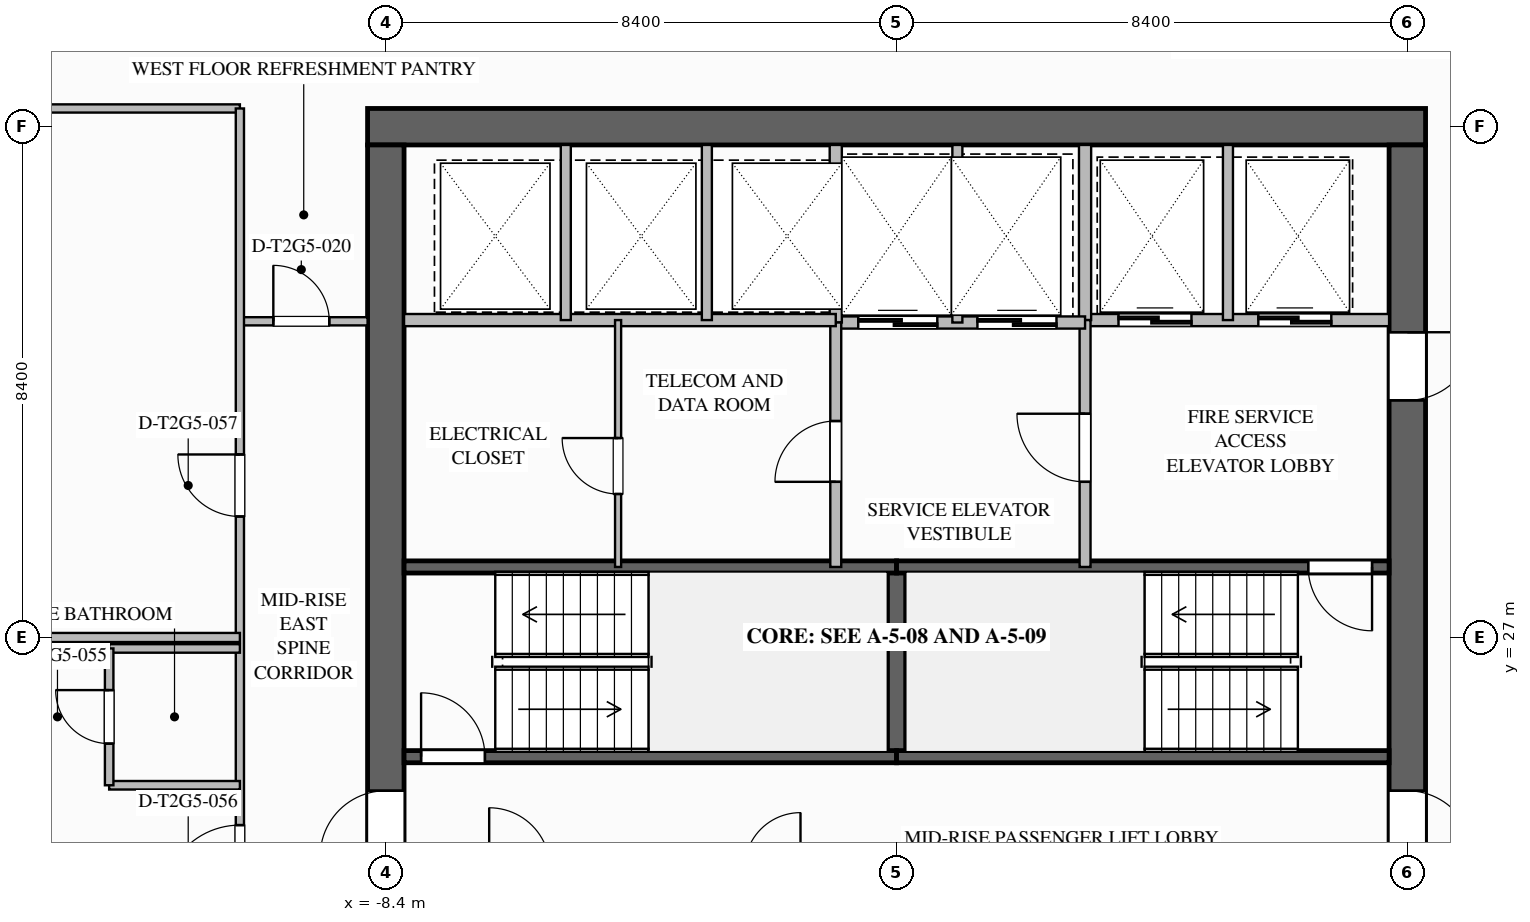
"""IFC4 building model, lengths in metres.
Left out: names, types, materials, properties, quantities, classifications, styles, units other than length and angle.
Written with IfcOpenShell. Run it as: python <this file> out.ifc"""

import sys

from ifc_helpers import new_model, si_unit, direction, frame, frame_2d, origin, place, context, subcontext, project, spatial, rectangle, extrude, element, fill, save


model = new_model("IFC4")
c1 = context("Model", 3, precision=1e-05, world=origin(), true_north=direction((0.0, 1.0)))
c2 = subcontext(c1, "Body", "Model", "MODEL_VIEW")
j1 = project(units=[si_unit("LENGTHUNIT", "METRE"), si_unit("PLANEANGLEUNIT", "RADIAN")], contexts=[c1])
p1 = place(None, origin())
s1 = spatial("IfcSite", under=j1, at=p1, CompositionType="ELEMENT")
p2 = place(p1, origin())
s2 = spatial("IfcBuilding", under=s1, at=p2, CompositionType="ELEMENT")
p3 = place(p2, frame((0.0, 0.0, 133.8)))
s3 = spatial("IfcBuildingStorey", under=s2, at=p3, CompositionType="ELEMENT", Elevation=133.8)
p4 = place(p3, frame((-8.7, 35.4, 0.0), z_axis=(0.0, 0.0, 1.0), x_axis=(1.0, 0.0, 0.0)))
e1 = element("IfcWall", 1, at=p4, inside=s3, PredefinedType="SHEAR", context=c2, shape_type="SweptSolid", body=[
    extrude(rectangle(XDim=17.4, YDim=0.6, at=frame_2d((8.7, 0.0))), origin(), (0.0, 0.0, 1.0), 3.5),
])
p5 = place(p3, frame((8.4, 35.1, 0.0), z_axis=(0.0, 0.0, 1.0), x_axis=(0.0, -1.0, 0.0)))
e2 = element("IfcWall", 2, at=p5, inside=s3, PredefinedType="SHEAR", context=c2, shape_type="SweptSolid", body=[
    extrude(rectangle(XDim=16.2, YDim=0.6, at=frame_2d((8.1, 0.0))), origin(), (0.0, 0.0, 1.0), 3.5),
])
p6 = place(p5, frame((3.08, 0.0, 0.0)))
e3 = element("IfcOpeningElement", 3, at=p6, cuts=e2, PredefinedType="OPENING", context=c2, shape_type="SweptSolid", body=[
    extrude(rectangle(XDim=1.12, YDim=2.1, at=frame_2d((0.56, 1.05))), frame((0.0, 0.31, 0.0), z_axis=(0.0, -1.0, 0.0), x_axis=(1.0, 0.0, 0.0)), (0.0, 0.0, 1.0), 0.62),
])
p7 = place(p5, frame((10.62, 0.0, 0.0)))
e4 = element("IfcOpeningElement", 4, at=p7, cuts=e2, PredefinedType="OPENING", context=c2, shape_type="SweptSolid", body=[
    extrude(rectangle(XDim=1.08, YDim=2.04, at=frame_2d((0.54, 1.02))), frame((0.0, 0.31, 0.0), z_axis=(0.0, -1.0, 0.0), x_axis=(1.0, 0.0, 0.0)), (0.0, 0.0, 1.0), 0.62),
])
p8 = place(p3, frame((-8.4, 18.9, 0.0), z_axis=(0.0, 0.0, 1.0), x_axis=(0.0, 1.0, 0.0)))
e5 = element("IfcWall", 5, at=p8, inside=s3, PredefinedType="SHEAR", context=c2, shape_type="SweptSolid", body=[
    extrude(rectangle(XDim=16.2, YDim=0.6, at=frame_2d((8.1, 0.0))), origin(), (0.0, 0.0, 1.0), 3.5),
])
p9 = place(p8, frame((4.5, 0.0, 0.0)))
e6 = element("IfcOpeningElement", 6, at=p9, cuts=e5, PredefinedType="OPENING", context=c2, shape_type="SweptSolid", body=[
    extrude(rectangle(XDim=1.08, YDim=2.04, at=frame_2d((0.54, 1.02))), frame((0.0, 0.31, 0.0), z_axis=(0.0, -1.0, 0.0), x_axis=(1.0, 0.0, 0.0)), (0.0, 0.0, 1.0), 0.62),
])
p10 = place(p3, frame((0.0, 25.04, 0.0), z_axis=(0.0, 0.0, 1.0), x_axis=(0.0, 1.0, 0.0)))
e7 = element("IfcWall", 7, at=p10, inside=s3, PredefinedType="SOLIDWALL", context=c2, shape_type="SweptSolid", body=[
    extrude(rectangle(XDim=3.12, YDim=0.3, at=frame_2d((1.56, 0.0))), origin(), (0.0, 0.0, 1.0), 3.24),
])
p11 = place(p3, frame((-8.1, 25.04, 0.0), z_axis=(0.0, 0.0, 1.0), x_axis=(1.0, 0.0, 0.0)))
e8 = element("IfcWall", 8, at=p11, inside=s3, PredefinedType="SOLIDWALL", context=c2, shape_type="SweptSolid", body=[
    extrude(rectangle(XDim=8.1, YDim=0.2, at=frame_2d((4.05, 0.0))), origin(), (0.0, 0.0, 1.0), 3.24),
])
p12 = place(p11, frame((0.28, 0.0, 0.0)))
e9 = element("IfcOpeningElement", 9, at=p12, cuts=e8, PredefinedType="OPENING", context=c2, shape_type="SweptSolid", body=[
    extrude(rectangle(XDim=1.05, YDim=2.1, at=frame_2d((0.525, 1.05))), frame((0.0, 0.11, 0.0), z_axis=(0.0, -1.0, 0.0), x_axis=(1.0, 0.0, 0.0)), (0.0, 0.0, 1.0), 0.22),
])
for number, where, z_axis, x_axis in (
    (10, (-8.1, 28.16, 0.0), (0.0, 0.0, 1.0), (1.0, 0.0, 0.0)),
    (11, (0.0, 25.04, 0.0), (0.0, 0.0, 1.0), (1.0, 0.0, 0.0)),
):
    element("IfcWall", number, at=place(p3, frame(where, z_axis=z_axis, x_axis=x_axis)), inside=s3, PredefinedType="SOLIDWALL", context=c2, shape_type="SweptSolid", body=[
        extrude(rectangle(XDim=8.1, YDim=0.2, at=frame_2d((4.05, 0.0))), origin(), (0.0, 0.0, 1.0), 3.24),
    ])
p13 = place(p3, frame((8.1, 28.16, 0.0), z_axis=(0.0, 0.0, 1.0), x_axis=(-1.0, 0.0, 0.0)))
e12 = element("IfcWall", 12, at=p13, inside=s3, PredefinedType="SOLIDWALL", context=c2, shape_type="SweptSolid", body=[
    extrude(rectangle(XDim=8.1, YDim=0.2, at=frame_2d((4.05, 0.0))), origin(), (0.0, 0.0, 1.0), 3.24),
])
p14 = place(p13, frame((0.28, 0.0, 0.0)))
e13 = element("IfcOpeningElement", 13, at=p14, cuts=e12, PredefinedType="OPENING", context=c2, shape_type="SweptSolid", body=[
    extrude(rectangle(XDim=1.05, YDim=2.1, at=frame_2d((0.525, 1.05))), frame((0.0, 0.11, 0.0), z_axis=(0.0, -1.0, 0.0), x_axis=(1.0, 0.0, 0.0)), (0.0, 0.0, 1.0), 0.22),
])
p15 = place(p3, frame((3.1, 32.22, 0.0), z_axis=(0.0, 0.0, 1.0), x_axis=(1.0, 0.0, 0.0)))
e14 = element("IfcWall", 14, at=p15, inside=s3, PredefinedType="SOLIDWALL", context=c2, shape_type="SweptSolid", body=[
    extrude(rectangle(XDim=5.0, YDim=0.2, at=frame_2d((2.5, 0.0))), origin(), (0.0, 0.0, 1.0), 3.24),
])
p16 = place(p15, frame((0.55, 0.0, 0.0)))
e15 = element("IfcOpeningElement", 15, at=p16, cuts=e14, PredefinedType="OPENING", context=c2, shape_type="SweptSolid", body=[
    extrude(rectangle(XDim=1.2, YDim=2.2, at=frame_2d((0.6, 1.1))), frame((0.0, 0.11, 0.0), z_axis=(0.0, -1.0, 0.0), x_axis=(1.0, 0.0, 0.0)), (0.0, 0.0, 1.0), 0.22),
])
p17 = place(p15, frame((2.85, 0.0, 0.0)))
e16 = element("IfcOpeningElement", 16, at=p17, cuts=e14, PredefinedType="OPENING", context=c2, shape_type="SweptSolid", body=[
    extrude(rectangle(XDim=1.2, YDim=2.2, at=frame_2d((0.6, 1.1))), frame((0.0, 0.11, 0.0), z_axis=(0.0, -1.0, 0.0), x_axis=(1.0, 0.0, 0.0)), (0.0, 0.0, 1.0), 0.22),
])
p18 = place(p3, frame((3.1, 32.22, 0.0), z_axis=(0.0, 0.0, 1.0), x_axis=(0.0, 1.0, 0.0)))
e17 = element("IfcWall", 17, at=p18, inside=s3, PredefinedType="SOLIDWALL", context=c2, shape_type="SweptSolid", body=[
    extrude(rectangle(XDim=2.88, YDim=0.2, at=frame_2d((1.44, 0.0))), origin(), (0.0, 0.0, 1.0), 3.24),
])
p19 = place(p3, frame((5.45, 32.22, 0.0), z_axis=(0.0, 0.0, 1.0), x_axis=(0.0, 1.0, 0.0)))
e18 = element("IfcWall", 18, at=p19, inside=s3, PredefinedType="PARTITIONING", context=c2, shape_type="SweptSolid", body=[
    extrude(rectangle(XDim=2.88, YDim=0.165, at=frame_2d((1.44, 0.0))), origin(), (0.0, 0.0, 1.0), 3.24),
])
p20 = place(p3, frame((3.1, 28.16, 0.0), z_axis=(0.0, 0.0, 1.0), x_axis=(0.0, 1.0, 0.0)))
e19 = element("IfcWall", 19, at=p20, inside=s3, PredefinedType="SOLIDWALL", context=c2, shape_type="SweptSolid", body=[
    extrude(rectangle(XDim=4.06, YDim=0.18, at=frame_2d((2.03, 0.0))), origin(), (0.0, 0.0, 1.0), 3.24),
])
p21 = place(p20, frame((1.4, 0.0, 0.0)))
e20 = element("IfcOpeningElement", 20, at=p21, cuts=e19, PredefinedType="OPENING", context=c2, shape_type="SweptSolid", body=[
    extrude(rectangle(XDim=1.12, YDim=2.1, at=frame_2d((0.56, 1.05))), frame((0.0, 0.1, 0.0), z_axis=(0.0, -1.0, 0.0), x_axis=(1.0, 0.0, 0.0)), (0.0, 0.0, 1.0), 0.2),
])
p22 = place(p3, frame((-1.0, 32.18, 0.0), z_axis=(0.0, 0.0, 1.0), x_axis=(1.0, 0.0, 0.0)))
e21 = element("IfcWall", 21, at=p22, inside=s3, PredefinedType="SOLIDWALL", context=c2, shape_type="SweptSolid", body=[
    extrude(rectangle(XDim=4.1, YDim=0.2, at=frame_2d((2.05, 0.0))), origin(), (0.0, 0.0, 1.0), 3.24),
])
p23 = place(p22, frame((0.37, 0.0, 0.0)))
e22 = element("IfcOpeningElement", 22, at=p23, cuts=e21, PredefinedType="OPENING", context=c2, shape_type="SweptSolid", body=[
    extrude(rectangle(XDim=1.3, YDim=2.2, at=frame_2d((0.65, 1.1))), frame((0.0, 0.11, 0.0), z_axis=(0.0, -1.0, 0.0), x_axis=(1.0, 0.0, 0.0)), (0.0, 0.0, 1.0), 0.22),
])
p24 = place(p22, frame((2.33, 0.0, 0.0)))
e23 = element("IfcOpeningElement", 23, at=p24, cuts=e21, PredefinedType="OPENING", context=c2, shape_type="SweptSolid", body=[
    extrude(rectangle(XDim=1.3, YDim=2.2, at=frame_2d((0.65, 1.1))), frame((0.0, 0.11, 0.0), z_axis=(0.0, -1.0, 0.0), x_axis=(1.0, 0.0, 0.0)), (0.0, 0.0, 1.0), 0.22),
])
p25 = place(p3, frame((-1.0, 32.18, 0.0), z_axis=(0.0, 0.0, 1.0), x_axis=(0.0, 1.0, 0.0)))
e24 = element("IfcWall", 24, at=p25, inside=s3, PredefinedType="SOLIDWALL", context=c2, shape_type="SweptSolid", body=[
    extrude(rectangle(XDim=2.92, YDim=0.2, at=frame_2d((1.46, 0.0))), origin(), (0.0, 0.0, 1.0), 3.24),
])
p26 = place(p3, frame((1.0, 32.18, 0.0), z_axis=(0.0, 0.0, 1.0), x_axis=(0.0, 1.0, 0.0)))
e25 = element("IfcWall", 25, at=p26, inside=s3, PredefinedType="PARTITIONING", context=c2, shape_type="SweptSolid", body=[
    extrude(rectangle(XDim=2.92, YDim=0.165, at=frame_2d((1.46, 0.0))), origin(), (0.0, 0.0, 1.0), 3.24),
])
p27 = place(p3, frame((-1.0, 28.16, 0.0), z_axis=(0.0, 0.0, 1.0), x_axis=(0.0, 1.0, 0.0)))
e26 = element("IfcWall", 26, at=p27, inside=s3, PredefinedType="SOLIDWALL", context=c2, shape_type="SweptSolid", body=[
    extrude(rectangle(XDim=4.02, YDim=0.18, at=frame_2d((2.01, 0.0))), origin(), (0.0, 0.0, 1.0), 3.24),
])
p28 = place(p27, frame((1.4, 0.0, 0.0)))
e27 = element("IfcOpeningElement", 27, at=p28, cuts=e26, PredefinedType="OPENING", context=c2, shape_type="SweptSolid", body=[
    extrude(rectangle(XDim=1.0, YDim=2.1, at=frame_2d((0.5, 1.05))), frame((0.0, 0.1, 0.0), z_axis=(0.0, -1.0, 0.0), x_axis=(1.0, 0.0, 0.0)), (0.0, 0.0, 1.0), 0.2),
])
p29 = place(p3, frame((-8.1, 32.22, 0.0), z_axis=(0.0, 0.0, 1.0), x_axis=(1.0, 0.0, 0.0)))
e28 = element("IfcWall", 28, at=p29, inside=s3, PredefinedType="SOLIDWALL", context=c2, shape_type="SweptSolid", body=[
    extrude(rectangle(XDim=7.1, YDim=0.2, at=frame_2d((3.55, 0.0))), origin(), (0.0, 0.0, 1.0), 3.24),
])
for number, where, z_axis, x_axis in (
    (29, (-5.44, 32.22, 0.0), (0.0, 0.0, 1.0), (0.0, 1.0, 0.0)),
    (30, (-3.12, 32.22, 0.0), (0.0, 0.0, 1.0), (0.0, 1.0, 0.0)),
):
    element("IfcWall", number, at=place(p3, frame(where, z_axis=z_axis, x_axis=x_axis)), inside=s3, PredefinedType="PARTITIONING", context=c2, shape_type="SweptSolid", body=[
        extrude(rectangle(XDim=2.88, YDim=0.165, at=frame_2d((1.44, 0.0))), origin(), (0.0, 0.0, 1.0), 3.24),
    ])
p30 = place(p3, frame((-4.58, 28.16, 0.0), z_axis=(0.0, 0.0, 1.0), x_axis=(0.0, 1.0, 0.0)))
e31 = element("IfcWall", 31, at=p30, inside=s3, PredefinedType="PARTITIONING", context=c2, shape_type="SweptSolid", body=[
    extrude(rectangle(XDim=4.06, YDim=0.1, at=frame_2d((2.03, 0.0))), origin(), (0.0, 0.0, 1.0), 3.24),
])
p31 = place(p30, frame((1.2, 0.0, 0.0)))
e32 = element("IfcOpeningElement", 32, at=p31, cuts=e31, PredefinedType="OPENING", context=c2, shape_type="SweptSolid", body=[
    extrude(rectangle(XDim=0.92, YDim=2.1, at=frame_2d((0.46, 1.05))), frame((0.0, 0.06, 0.0), z_axis=(0.0, -1.0, 0.0), x_axis=(1.0, 0.0, 0.0)), (0.0, 0.0, 1.0), 0.12),
])
p32 = place(p3, frame((-10.8, 32.2, 0.0), z_axis=(0.0, 0.0, 1.0), x_axis=(1.0, 0.0, 0.0)))
e33 = element("IfcWall", 33, at=p32, inside=s3, PredefinedType="PARTITIONING", context=c2, shape_type="SweptSolid", body=[
    extrude(rectangle(XDim=2.1, YDim=0.135, at=frame_2d((1.05, 0.0))), origin(), (0.0, 0.0, 1.0), 3.24),
])
p33 = place(p32, frame((0.55, 0.0, 0.0)))
e34 = element("IfcOpeningElement", 34, at=p33, cuts=e33, PredefinedType="OPENING", context=c2, shape_type="SweptSolid", body=[
    extrude(rectangle(XDim=0.92, YDim=2.1, at=frame_2d((0.46, 1.05))), frame((0.0, 0.077, 0.0), z_axis=(0.0, -1.0, 0.0), x_axis=(1.0, 0.0, 0.0)), (0.0, 0.0, 1.0), 0.155),
])
p34 = place(p3, frame((-16.2, 35.7, 0.0), z_axis=(0.0, 0.0, 1.0), x_axis=(1.0, 0.0, 0.0)))
e35 = element("IfcWall", 35, at=p34, inside=s3, PredefinedType="PARTITIONING", context=c2, shape_type="SweptSolid", body=[
    extrude(rectangle(XDim=5.4, YDim=0.135, at=frame_2d((2.7, 0.0))), origin(), (0.0, 0.0, 1.0), 3.24),
])
p35 = place(p3, frame((-10.8, 18.3, 0.0), z_axis=(0.0, 0.0, 1.0), x_axis=(0.0, 1.0, 0.0)))
e36 = element("IfcWall", 36, at=p35, inside=s3, PredefinedType="PARTITIONING", context=c2, shape_type="SweptSolid", body=[
    extrude(rectangle(XDim=17.4, YDim=0.135, at=frame_2d((8.7, 0.0))), origin(), (0.0, 0.0, 1.0), 3.24),
])
p36 = place(p35, frame((4.355, 0.0, 0.0)))
e37 = element("IfcOpeningElement", 37, at=p36, cuts=e36, PredefinedType="OPENING", context=c2, shape_type="SweptSolid", body=[
    extrude(rectangle(XDim=1.26, YDim=2.2, at=frame_2d((0.63, 1.1))), frame((0.0, 0.077, 0.0), z_axis=(0.0, -1.0, 0.0), x_axis=(1.0, 0.0, 0.0)), (0.0, 0.0, 1.0), 0.155),
])
p37 = place(p35, frame((10.69, 0.0, 0.0)))
e38 = element("IfcOpeningElement", 38, at=p37, cuts=e36, PredefinedType="OPENING", context=c2, shape_type="SweptSolid", body=[
    extrude(rectangle(XDim=1.02, YDim=2.15, at=frame_2d((0.51, 1.075))), frame((0.0, 0.077, 0.0), z_axis=(0.0, -1.0, 0.0), x_axis=(1.0, 0.0, 0.0)), (0.0, 0.0, 1.0), 0.155),
])
p38 = place(p3, frame((-26.2, 27.0, 0.0), z_axis=(0.0, 0.0, 1.0), x_axis=(1.0, 0.0, 0.0)))
e39 = element("IfcWall", 39, at=p38, inside=s3, PredefinedType="PARTITIONING", context=c2, shape_type="SweptSolid", body=[
    extrude(rectangle(XDim=15.4, YDim=0.15, at=frame_2d((7.7, 0.0))), origin(), (0.0, 0.0, 1.0), 2.53),
])
p39 = place(p3, frame((-10.8, 24.57, 0.0), z_axis=(0.0, 0.0, 1.0), x_axis=(-1.0, 0.0, 0.0)))
e40 = element("IfcWall", 40, at=p39, inside=s3, PredefinedType="PLUMBINGWALL", context=c2, shape_type="SweptSolid", body=[
    extrude(rectangle(XDim=2.15, YDim=0.14, at=frame_2d((1.075, 0.0))), origin(), (0.0, 0.0, 1.0), 3.24),
])
p40 = place(p3, frame((-10.8, 26.82, 0.0), z_axis=(0.0, 0.0, 1.0), x_axis=(-1.0, 0.0, 0.0)))
e41 = element("IfcWall", 41, at=p40, inside=s3, PredefinedType="PLUMBINGWALL", context=c2, shape_type="SweptSolid", body=[
    extrude(rectangle(XDim=2.15, YDim=0.14, at=frame_2d((1.075, 0.0))), origin(), (0.0, 0.0, 1.0), 2.617),
])
p41 = place(p3, frame((-12.95, 24.57, 0.0), z_axis=(0.0, 0.0, 1.0), x_axis=(0.0, 1.0, 0.0)))
e42 = element("IfcWall", 42, at=p41, inside=s3, PredefinedType="PLUMBINGWALL", context=c2, shape_type="SweptSolid", body=[
    extrude(rectangle(XDim=2.25, YDim=0.14, at=frame_2d((1.125, 0.0))), origin(), (0.0, 0.0, 1.0), 3.24),
])
p42 = place(p41, frame((0.685, 0.0, 0.0)))
e43 = element("IfcOpeningElement", 43, at=p42, cuts=e42, PredefinedType="OPENING", context=c2, shape_type="SweptSolid", body=[
    extrude(rectangle(XDim=0.88, YDim=2.1, at=frame_2d((0.44, 1.05))), frame((0.0, 0.08, 0.0), z_axis=(0.0, -1.0, 0.0), x_axis=(1.0, 0.0, 0.0)), (0.0, 0.0, 1.0), 0.16),
])
p43 = place(p12, origin())
e44 = element("IfcDoor", 44, at=p43, inside=s3, OperationType="SINGLE_SWING_LEFT", PredefinedType="DOOR", context=c2, shape_type="SweptSolid", body=[
    extrude(rectangle(XDim=1.05, YDim=2.1, at=frame_2d((0.525, 1.05))), frame((0.0, 0.025, 0.0), z_axis=(0.0, -1.0, 0.0), x_axis=(1.0, 0.0, 0.0)), (0.0, 0.0, 1.0), 0.05),
])
fill(e9, e44)
p44 = place(p14, origin())
e45 = element("IfcDoor", 45, at=p44, inside=s3, OperationType="SINGLE_SWING_LEFT", PredefinedType="DOOR", context=c2, shape_type="SweptSolid", body=[
    extrude(rectangle(XDim=1.05, YDim=2.1, at=frame_2d((0.525, 1.05))), frame((0.0, 0.025, 0.0), z_axis=(0.0, -1.0, 0.0), x_axis=(1.0, 0.0, 0.0)), (0.0, 0.0, 1.0), 0.05),
])
fill(e13, e45)
p45 = place(p16, origin())
e46 = element("IfcDoor", 46, at=p45, inside=s3, OperationType="SLIDING_TO_LEFT", PredefinedType="DOOR", context=c2, shape_type="SweptSolid", body=[
    extrude(rectangle(XDim=1.2, YDim=2.2, at=frame_2d((0.6, 1.1))), frame((0.0, 0.025, 0.0), z_axis=(0.0, -1.0, 0.0), x_axis=(1.0, 0.0, 0.0)), (0.0, 0.0, 1.0), 0.05),
])
fill(e15, e46)
p46 = place(p17, origin())
e47 = element("IfcDoor", 47, at=p46, inside=s3, OperationType="SLIDING_TO_LEFT", PredefinedType="DOOR", context=c2, shape_type="SweptSolid", body=[
    extrude(rectangle(XDim=1.2, YDim=2.2, at=frame_2d((0.6, 1.1))), frame((0.0, 0.025, 0.0), z_axis=(0.0, -1.0, 0.0), x_axis=(1.0, 0.0, 0.0)), (0.0, 0.0, 1.0), 0.05),
])
fill(e16, e47)
p47 = place(p21, origin())
e48 = element("IfcDoor", 48, at=p47, inside=s3, OperationType="SINGLE_SWING_RIGHT", PredefinedType="DOOR", context=c2, shape_type="SweptSolid", body=[
    extrude(rectangle(XDim=1.12, YDim=2.1, at=frame_2d((0.56, 1.05))), frame((0.0, 0.025, 0.0), z_axis=(0.0, -1.0, 0.0), x_axis=(1.0, 0.0, 0.0)), (0.0, 0.0, 1.0), 0.05),
])
fill(e20, e48)
p48 = place(p6, origin())
e49 = element("IfcDoor", 49, at=p48, inside=s3, OperationType="SINGLE_SWING_LEFT", PredefinedType="DOOR", context=c2, shape_type="SweptSolid", body=[
    extrude(rectangle(XDim=1.12, YDim=2.1, at=frame_2d((0.56, 1.05))), frame((0.0, 0.025, 0.0), z_axis=(0.0, -1.0, 0.0), x_axis=(1.0, 0.0, 0.0)), (0.0, 0.0, 1.0), 0.05),
])
fill(e3, e49)
p49 = place(p23, origin())
e50 = element("IfcDoor", 50, at=p49, inside=s3, OperationType="SLIDING_TO_LEFT", PredefinedType="DOOR", context=c2, shape_type="SweptSolid", body=[
    extrude(rectangle(XDim=1.3, YDim=2.2, at=frame_2d((0.65, 1.1))), frame((0.0, 0.025, 0.0), z_axis=(0.0, -1.0, 0.0), x_axis=(1.0, 0.0, 0.0)), (0.0, 0.0, 1.0), 0.05),
])
fill(e22, e50)
p50 = place(p24, origin())
e51 = element("IfcDoor", 51, at=p50, inside=s3, OperationType="SLIDING_TO_LEFT", PredefinedType="DOOR", context=c2, shape_type="SweptSolid", body=[
    extrude(rectangle(XDim=1.3, YDim=2.2, at=frame_2d((0.65, 1.1))), frame((0.0, 0.025, 0.0), z_axis=(0.0, -1.0, 0.0), x_axis=(1.0, 0.0, 0.0)), (0.0, 0.0, 1.0), 0.05),
])
fill(e23, e51)
p51 = place(p28, origin())
e52 = element("IfcDoor", 52, at=p51, inside=s3, OperationType="SINGLE_SWING_LEFT", PredefinedType="DOOR", context=c2, shape_type="SweptSolid", body=[
    extrude(rectangle(XDim=1.0, YDim=2.1, at=frame_2d((0.5, 1.05))), frame((0.0, 0.025, 0.0), z_axis=(0.0, -1.0, 0.0), x_axis=(1.0, 0.0, 0.0)), (0.0, 0.0, 1.0), 0.05),
])
fill(e27, e52)
p52 = place(p31, origin())
e53 = element("IfcDoor", 53, at=p52, inside=s3, OperationType="SINGLE_SWING_RIGHT", PredefinedType="DOOR", context=c2, shape_type="SweptSolid", body=[
    extrude(rectangle(XDim=0.92, YDim=2.1, at=frame_2d((0.46, 1.05))), frame((0.0, 0.025, 0.0), z_axis=(0.0, -1.0, 0.0), x_axis=(1.0, 0.0, 0.0)), (0.0, 0.0, 1.0), 0.05),
])
fill(e32, e53)
p53 = place(p9, origin())
e54 = element("IfcDoor", 54, at=p53, inside=s3, OperationType="SINGLE_SWING_LEFT", PredefinedType="DOOR", context=c2, shape_type="SweptSolid", body=[
    extrude(rectangle(XDim=1.08, YDim=2.04, at=frame_2d((0.54, 1.02))), frame((0.0, 0.025, 0.0), z_axis=(0.0, -1.0, 0.0), x_axis=(1.0, 0.0, 0.0)), (0.0, 0.0, 1.0), 0.05),
])
fill(e6, e54)
p54 = place(p7, origin())
e55 = element("IfcDoor", 55, at=p54, inside=s3, OperationType="SINGLE_SWING_RIGHT", PredefinedType="DOOR", context=c2, shape_type="SweptSolid", body=[
    extrude(rectangle(XDim=1.08, YDim=2.04, at=frame_2d((0.54, 1.02))), frame((0.0, 0.025, 0.0), z_axis=(0.0, -1.0, 0.0), x_axis=(1.0, 0.0, 0.0)), (0.0, 0.0, 1.0), 0.05),
])
fill(e4, e55)
p55 = place(p33, origin())
e56 = element("IfcDoor", 56, at=p55, inside=s3, OperationType="SINGLE_SWING_LEFT", PredefinedType="DOOR", context=c2, shape_type="SweptSolid", body=[
    extrude(rectangle(XDim=0.92, YDim=2.1, at=frame_2d((0.46, 1.05))), frame((0.0, 0.025, 0.0), z_axis=(0.0, -1.0, 0.0), x_axis=(1.0, 0.0, 0.0)), (0.0, 0.0, 1.0), 0.05),
])
fill(e34, e56)
p56 = place(p42, origin())
e57 = element("IfcDoor", 57, at=p56, inside=s3, OperationType="SINGLE_SWING_RIGHT", PredefinedType="DOOR", context=c2, shape_type="SweptSolid", body=[
    extrude(rectangle(XDim=0.88, YDim=2.1, at=frame_2d((0.44, 1.05))), frame((0.0, 0.025, 0.0), z_axis=(0.0, -1.0, 0.0), x_axis=(1.0, 0.0, 0.0)), (0.0, 0.0, 1.0), 0.05),
])
fill(e43, e57)
p57 = place(p36, origin())
e58 = element("IfcDoor", 58, at=p57, inside=s3, OperationType="SINGLE_SWING_LEFT", PredefinedType="DOOR", context=c2, shape_type="SweptSolid", body=[
    extrude(rectangle(XDim=1.26, YDim=2.2, at=frame_2d((0.63, 1.1))), frame((0.0, 0.025, 0.0), z_axis=(0.0, -1.0, 0.0), x_axis=(1.0, 0.0, 0.0)), (0.0, 0.0, 1.0), 0.05),
])
fill(e37, e58)
p58 = place(p37, origin())
e59 = element("IfcDoor", 59, at=p58, inside=s3, OperationType="SINGLE_SWING_RIGHT", PredefinedType="DOOR", context=c2, shape_type="SweptSolid", body=[
    extrude(rectangle(XDim=1.02, YDim=2.15, at=frame_2d((0.51, 1.075))), frame((0.0, 0.025, 0.0), z_axis=(0.0, -1.0, 0.0), x_axis=(1.0, 0.0, 0.0)), (0.0, 0.0, 1.0), 0.05),
])
fill(e38, e59)
save(model, sys.argv[1])
